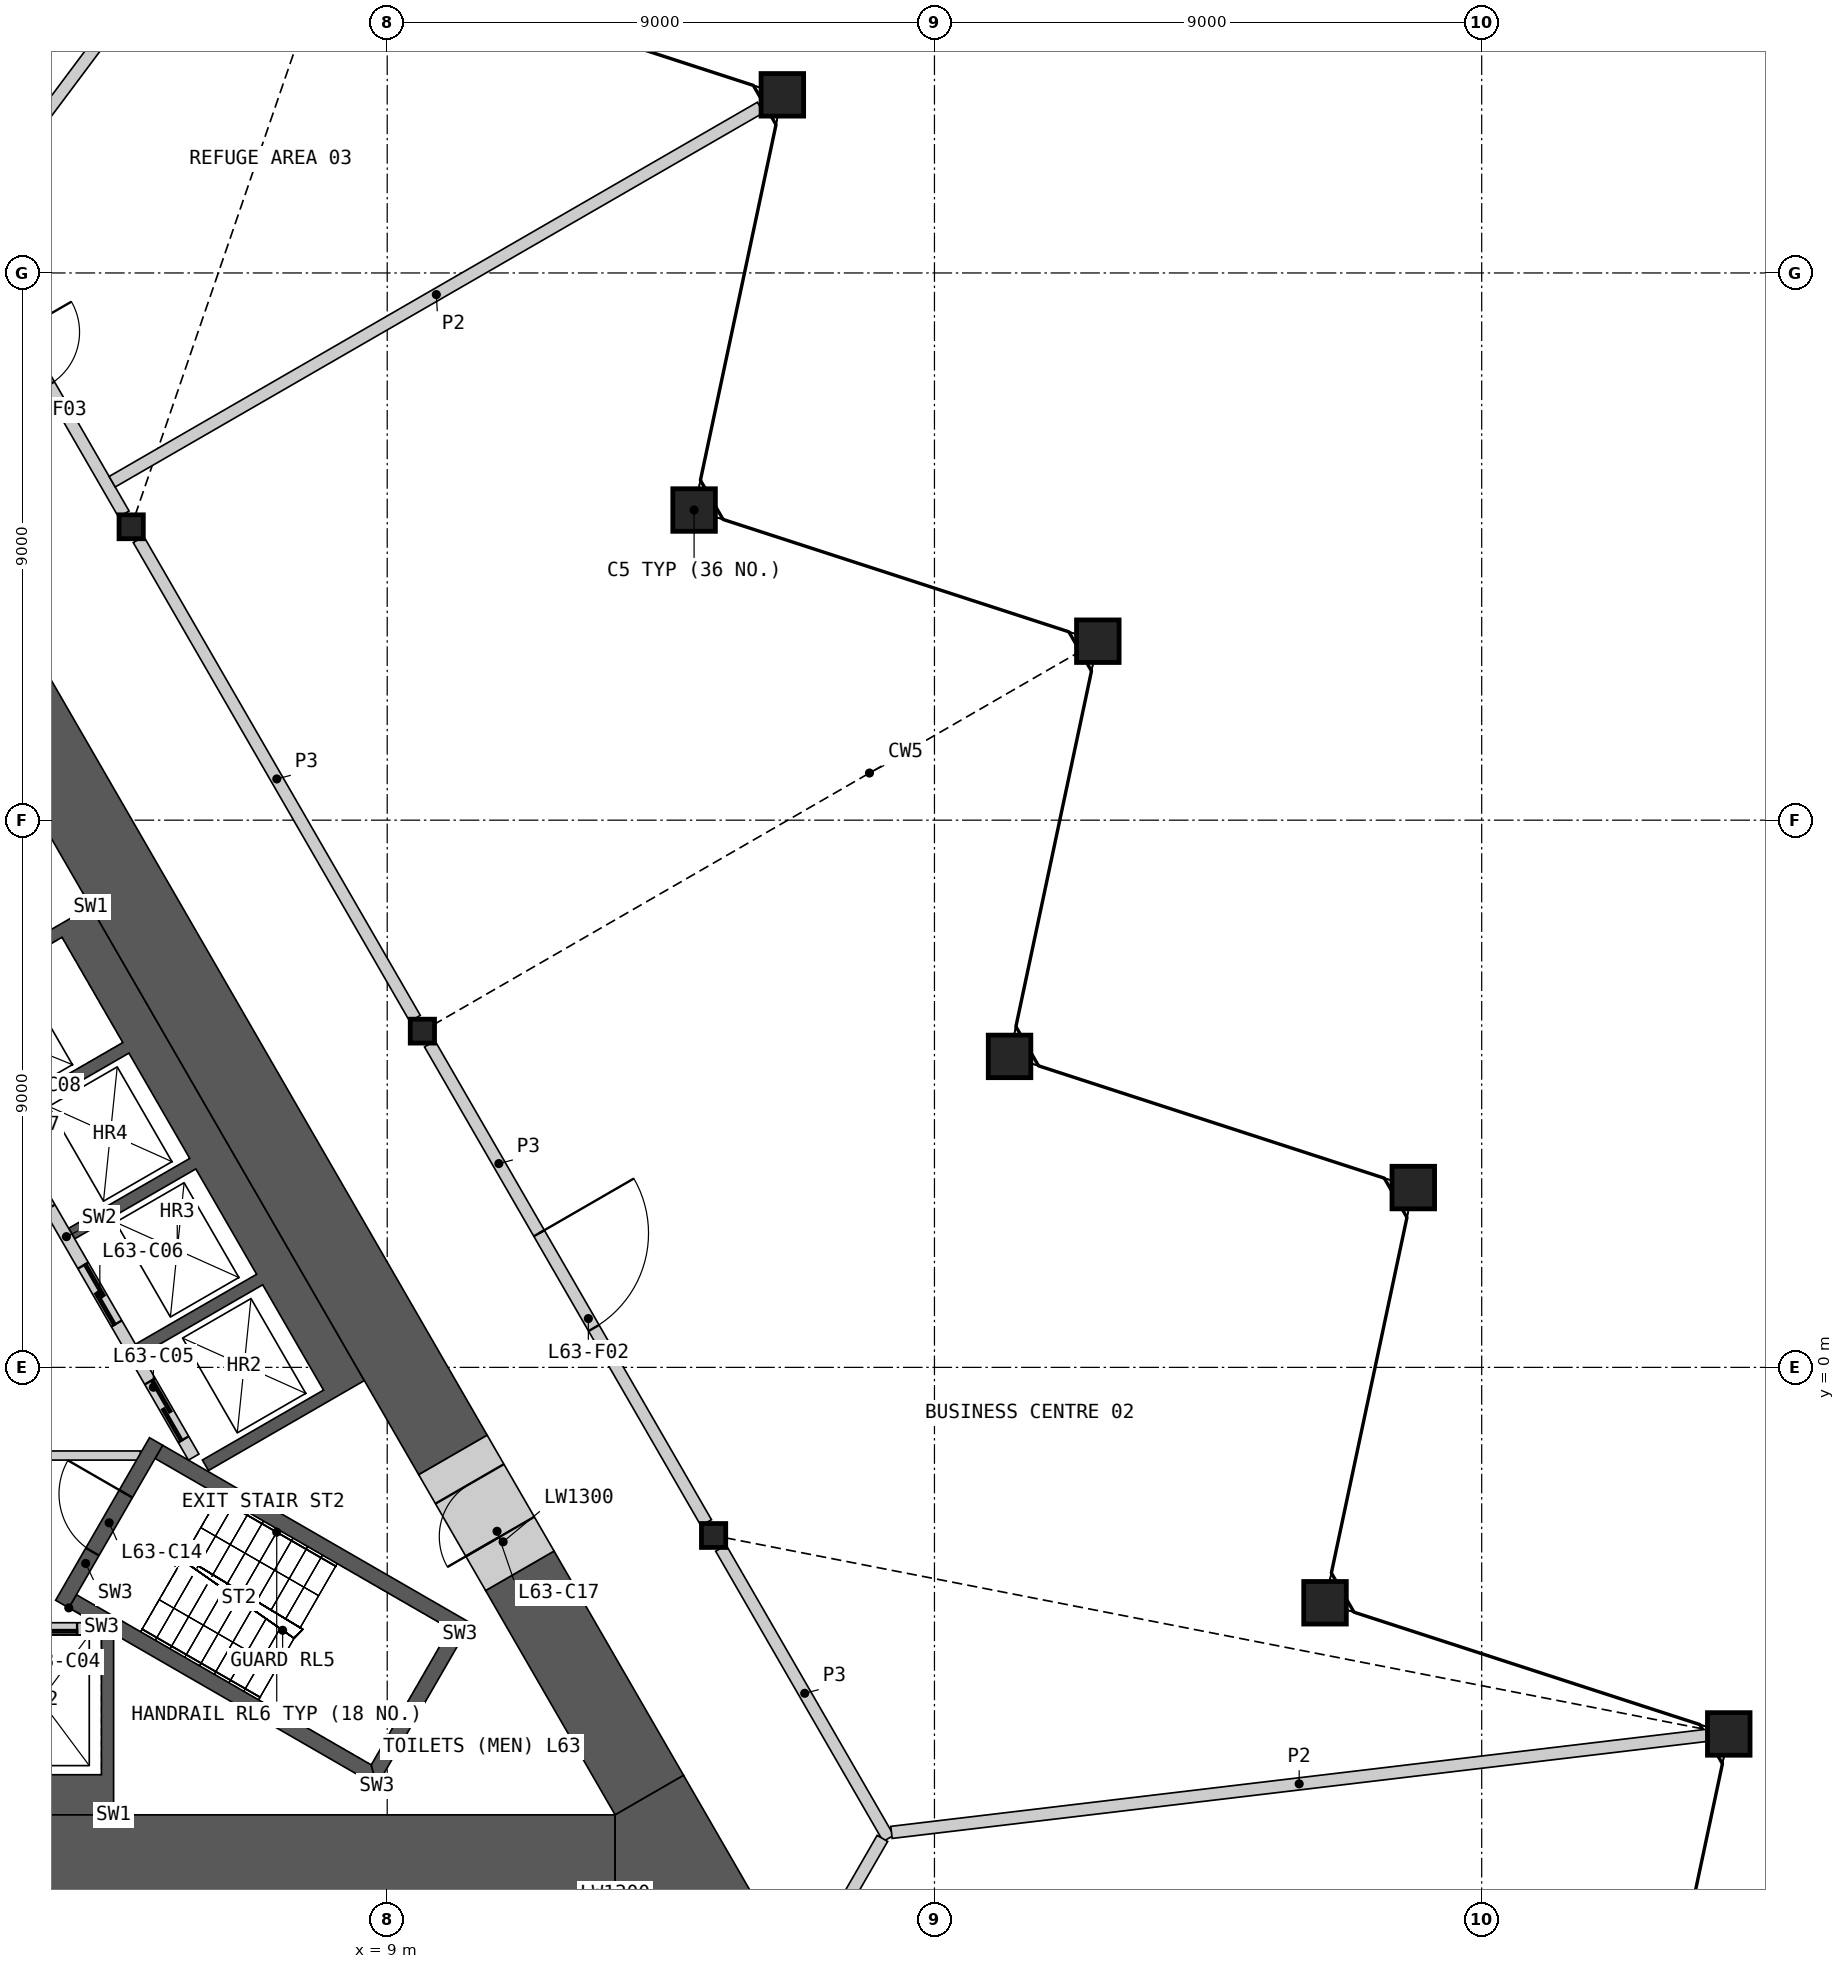
"""IFC4 building model, lengths in metres.
Left out: names, types, materials, properties, quantities, classifications, styles, units other than length and angle.
Written with IfcOpenShell. Run it as: python <this file> out.ifc"""

import sys

from ifc_helpers import new_model, si_unit, direction, frame, frame_2d, origin, origin_2d, place, context, subcontext, project, spatial, polyline, rectangle, hollow_rectangle, i_section, outline, extrude, element, fill, save


model = new_model("IFC4")
c1 = context("Model", 3, precision=1e-05, world=origin(), true_north=direction((0.0, 1.0)))
c2 = subcontext(c1, "Body", "Model", "MODEL_VIEW")
j1 = project(units=[si_unit("LENGTHUNIT", "METRE"), si_unit("PLANEANGLEUNIT", "RADIAN")], contexts=[c1])
p1 = place(None, origin())
s1 = spatial("IfcSite", under=j1, at=p1, CompositionType="ELEMENT")
p2 = place(p1, origin())
s2 = spatial("IfcBuilding", under=s1, at=p2, CompositionType="ELEMENT")
p3 = place(p2, frame((0.0, 0.0, 277.8)))
s3 = spatial("IfcBuildingStorey", under=s2, at=p3, CompositionType="ELEMENT", Elevation=277.8)
for number, where, z_axis, x_axis in (
    (1, (31.063, -6.029, 0.0), (0.0, 0.0, 1.0), (1.0, 0.0, 0.0)),
    (2, (24.423, -3.872, 0.0), (0.0, 0.0, 1.0), (1.0, 0.0, 0.0)),
    (3, (25.875, 2.957, 0.0), (0.0, 0.0, 1.0), (1.0, 0.0, 0.0)),
    (4, (19.235, 5.115, 0.0), (0.0, 0.0, 1.0), (1.0, 0.0, 0.0)),
    (5, (20.687, 11.943, 0.0), (0.0, 0.0, 1.0), (1.0, 0.0, 0.0)),
    (6, (14.047, 14.101, 0.0), (0.0, 0.0, 1.0), (1.0, 0.0, 0.0)),
    (7, (15.499, 20.93, 0.0), (0.0, 0.0, 1.0), (1.0, 0.0, 0.0)),
):
    element("IfcColumn", number, at=place(p3, frame(where, z_axis=z_axis, x_axis=x_axis)), inside=s3, PredefinedType="COLUMN", context=c2, shape_type="SweptSolid", body=[
        extrude(hollow_rectangle(XDim=0.7, YDim=0.7, WallThickness=0.045, at=origin_2d()), origin(), (0.0, 0.0, 1.0), 10.0),
    ])
for number, where, z_axis, x_axis in (
    (8, (14.368, -2.765, 0.0), (0.0, 0.0, 1.0), (1.0, 0.0, 0.0)),
    (9, (9.578, 5.53, 0.0), (0.0, 0.0, 1.0), (1.0, 0.0, 0.0)),
    (10, (4.789, 13.825, 0.0), (0.0, 0.0, 1.0), (1.0, 0.0, 0.0)),
):
    element("IfcColumn", number, at=place(p3, frame(where, z_axis=z_axis, x_axis=x_axis)), inside=s3, PredefinedType="COLUMN", context=c2, shape_type="SweptSolid", body=[
        extrude(i_section(OverallWidth=0.399, OverallDepth=0.393, WebThickness=0.023, FlangeThickness=0.037, at=origin_2d()), origin(), (0.0, 0.0, 1.0), 10.0),
    ])
p4 = place(p3, origin())
e11 = element("IfcWall", 11, at=p4, inside=s3, PredefinedType="SHEAR", context=c2, shape_type="SweptSolid", body=[
    extrude(outline(polyline([(4.5, -7.36), (-4.5, -7.36), (-4.5, -4.4), (-4.3, -4.4), (-4.3, -6.7), (-2.3, -6.7), (-2.3, -4.4), (-2.1, -4.4), (-2.1, -6.7), (-0.1, -6.7), (-0.1, -4.4), (0.1, -4.4), (0.1, -6.7), (2.1, -6.7), (2.1, -4.4), (2.3, -4.4), (2.3, -6.7), (4.3, -6.7), (4.3, -4.4), (4.5, -4.4), (4.5, -7.36)])), origin(), (0.0, 0.0, 1.0), 9.65),
])
p5 = place(p3, frame((-4.187, -4.3, 0.0), z_axis=(0.0, 0.0, 1.0), x_axis=(1.0, 0.0, 0.0)))
e12 = element("IfcWall", 12, at=p5, inside=s3, PredefinedType="SOLIDWALL", context=c2, shape_type="SweptSolid", body=[
    extrude(rectangle(XDim=8.373, YDim=0.2, at=frame_2d((4.187, 0.0))), origin(), (0.0, 0.0, 1.0), 9.65),
])
p6 = place(p5, frame((0.287, 0.0, 0.0)))
e13 = element("IfcOpeningElement", 13, at=p6, cuts=e12, PredefinedType="OPENING", context=c2, shape_type="SweptSolid", body=[
    extrude(rectangle(XDim=1.2, YDim=2.1, at=frame_2d((0.6, 1.05))), frame((0.0, 0.11, 0.0), z_axis=(0.0, -1.0, 0.0), x_axis=(1.0, 0.0, 0.0)), (0.0, 0.0, 1.0), 0.22),
])
p7 = place(p5, frame((2.387, 0.0, 0.0)))
e14 = element("IfcOpeningElement", 14, at=p7, cuts=e12, PredefinedType="OPENING", context=c2, shape_type="SweptSolid", body=[
    extrude(rectangle(XDim=1.4, YDim=2.1, at=frame_2d((0.7, 1.05))), frame((0.0, 0.11, 0.0), z_axis=(0.0, -1.0, 0.0), x_axis=(1.0, 0.0, 0.0)), (0.0, 0.0, 1.0), 0.22),
])
p8 = place(p5, frame((4.737, 0.0, 0.0)))
e15 = element("IfcOpeningElement", 15, at=p8, cuts=e12, PredefinedType="OPENING", context=c2, shape_type="SweptSolid", body=[
    extrude(rectangle(XDim=1.1, YDim=2.1, at=frame_2d((0.55, 1.05))), frame((0.0, 0.11, 0.0), z_axis=(0.0, -1.0, 0.0), x_axis=(1.0, 0.0, 0.0)), (0.0, 0.0, 1.0), 0.22),
])
p9 = place(p5, frame((6.887, 0.0, 0.0)))
e16 = element("IfcOpeningElement", 16, at=p9, cuts=e12, PredefinedType="OPENING", context=c2, shape_type="SweptSolid", body=[
    extrude(rectangle(XDim=1.2, YDim=2.1, at=frame_2d((0.6, 1.05))), frame((0.0, 0.11, 0.0), z_axis=(0.0, -1.0, 0.0), x_axis=(1.0, 0.0, 0.0)), (0.0, 0.0, 1.0), 0.22),
])
p10 = place(p3, origin())
e17 = element("IfcWall", 17, at=p10, inside=s3, PredefinedType="SHEAR", context=c2, shape_type="SweptSolid", body=[
    extrude(outline(polyline([(4.124, 7.577), (8.624, -0.217), (8.231, -0.444), (6.061, -1.697), (5.96, -1.524), (7.952, -0.374), (6.952, 1.358), (4.96, 0.208), (4.861, 0.381), (6.852, 1.531), (5.852, 3.263), (3.861, 2.113), (3.76, 2.287), (5.752, 3.437), (4.752, 5.169), (2.76, 4.019), (2.66, 4.192), (4.652, 5.342), (3.652, 7.074), (1.66, 5.924), (1.561, 6.097), (3.731, 7.35), (4.124, 7.577)])), origin(), (0.0, 0.0, 1.0), 9.65),
])
p11 = place(p3, frame((5.817, -1.476, 0.0), z_axis=(0.0, 0.0, 1.0), x_axis=(-0.500002616675, 0.866023893041, 0.0)))
e18 = element("IfcWall", 18, at=p11, inside=s3, PredefinedType="SOLIDWALL", context=c2, shape_type="SweptSolid", body=[
    extrude(rectangle(XDim=8.373, YDim=0.2, at=frame_2d((4.187, 0.0))), origin(), (0.0, 0.0, 1.0), 9.65),
])
p12 = place(p11, frame((0.337, 0.0, 0.0)))
e19 = element("IfcOpeningElement", 19, at=p12, cuts=e18, PredefinedType="OPENING", context=c2, shape_type="SweptSolid", body=[
    extrude(rectangle(XDim=1.1, YDim=2.1, at=frame_2d((0.55, 1.05))), frame((0.0, 0.11, 0.0), z_axis=(0.0, -1.0, 0.0), x_axis=(1.0, 0.0, 0.0)), (0.0, 0.0, 1.0), 0.22),
])
p13 = place(p11, frame((2.537, 0.0, 0.0)))
e20 = element("IfcOpeningElement", 20, at=p13, cuts=e18, PredefinedType="OPENING", context=c2, shape_type="SweptSolid", body=[
    extrude(rectangle(XDim=1.1, YDim=2.1, at=frame_2d((0.55, 1.05))), frame((0.0, 0.11, 0.0), z_axis=(0.0, -1.0, 0.0), x_axis=(1.0, 0.0, 0.0)), (0.0, 0.0, 1.0), 0.22),
])
p14 = place(p11, frame((4.737, 0.0, 0.0)))
e21 = element("IfcOpeningElement", 21, at=p14, cuts=e18, PredefinedType="OPENING", context=c2, shape_type="SweptSolid", body=[
    extrude(rectangle(XDim=1.1, YDim=2.1, at=frame_2d((0.55, 1.05))), frame((0.0, 0.11, 0.0), z_axis=(0.0, -1.0, 0.0), x_axis=(1.0, 0.0, 0.0)), (0.0, 0.0, 1.0), 0.22),
])
p15 = place(p11, frame((6.937, 0.0, 0.0)))
e22 = element("IfcOpeningElement", 22, at=p15, cuts=e18, PredefinedType="OPENING", context=c2, shape_type="SweptSolid", body=[
    extrude(rectangle(XDim=1.1, YDim=2.1, at=frame_2d((0.55, 1.05))), frame((0.0, 0.11, 0.0), z_axis=(0.0, -1.0, 0.0), x_axis=(1.0, 0.0, 0.0)), (0.0, 0.0, 1.0), 0.22),
])
p16 = place(p3, frame((-4.941, -1.45, 0.0), z_axis=(0.0, 0.0, 1.0), x_axis=(1.0, 0.0, 0.0)))
e23 = element("IfcWall", 23, at=p16, inside=s3, PredefinedType="PARTITIONING", context=c2, shape_type="SweptSolid", body=[
    extrude(rectangle(XDim=9.882, YDim=0.15, at=frame_2d((4.941, 0.0))), origin(), (0.0, 0.0, 1.0), 9.65),
])
p17 = place(p16, frame((4.391, 0.0, 0.0)))
e24 = element("IfcOpeningElement", 24, at=p17, cuts=e23, PredefinedType="OPENING", context=c2, shape_type="SweptSolid", body=[
    extrude(rectangle(XDim=1.1, YDim=2.1, at=frame_2d((0.55, 1.05))), frame((0.0, 0.085, 0.0), z_axis=(0.0, -1.0, 0.0), x_axis=(1.0, 0.0, 0.0)), (0.0, 0.0, 1.0), 0.17),
])
p18 = place(p3, origin())
e25 = element("IfcWall", 25, at=p18, inside=s3, PredefinedType="SHEAR", context=c2, shape_type="SweptSolid", body=[
    extrude(outline(polyline([(3.763, -3.956), (8.83, -6.881), (8.738, -6.539), (3.888, -3.739), (3.763, -3.956)])), origin(), (0.0, 0.0, 1.0), 9.65),
])
p19 = place(p3, origin())
e26 = element("IfcWall", 26, at=p19, inside=s3, PredefinedType="SHEAR", context=c2, shape_type="SweptSolid", body=[
    extrude(outline(polyline([(8.83, -6.881), (10.374, -4.206), (10.032, -4.298), (8.738, -6.539), (8.83, -6.881)])), origin(), (0.0, 0.0, 1.0), 9.65),
])
p20 = place(p3, origin())
e27 = element("IfcWall", 27, at=p20, inside=s3, PredefinedType="SHEAR", context=c2, shape_type="SweptSolid", body=[
    extrude(outline(polyline([(10.032, -4.298), (10.374, -4.206), (5.307, -1.281), (5.182, -1.498), (10.032, -4.298)])), origin(), (0.0, 0.0, 1.0), 9.65),
])
p21 = place(p3, frame((3.655, -3.893, 0.0), z_axis=(0.0, 0.0, 1.0), x_axis=(0.499982516597, 0.866035497597, 0.0)))
e28 = element("IfcWall", 28, at=p21, inside=s3, PredefinedType="SHEAR", context=c2, shape_type="SweptSolid", body=[
    extrude(rectangle(XDim=3.088, YDim=0.25, at=frame_2d((1.544, 0.0))), origin(), (0.0, 0.0, 1.0), 9.65),
])
p22 = place(p21, frame((0.994, 0.0, 0.0)))
e29 = element("IfcOpeningElement", 29, at=p22, cuts=e28, PredefinedType="OPENING", context=c2, shape_type="SweptSolid", body=[
    extrude(rectangle(XDim=1.1, YDim=2.1, at=frame_2d((0.55, 1.05))), frame((0.0, 0.135, 0.0), z_axis=(0.0, -1.0, 0.0), x_axis=(1.0, 0.0, 0.0)), (0.0, 0.0, 1.0), 0.27),
])
p23 = place(p3, frame((-12.748, -8.01, 0.0), z_axis=(0.0, 0.0, 1.0), x_axis=(1.0, 0.0, 0.0)))
e30 = element("IfcWall", 30, at=p23, inside=s3, PredefinedType="SHEAR", context=c2, shape_type="SweptSolid", body=[
    extrude(rectangle(XDim=25.497, YDim=1.3, at=frame_2d((12.748, 0.0))), origin(), (0.0, 0.0, 1.0), 9.65),
])
p24 = place(p3, frame((10.081, -1.441, 0.0), z_axis=(0.0, 0.0, 1.0), x_axis=(-0.500002581376, 0.866023913421, 0.0)))
e31 = element("IfcWall", 31, at=p24, inside=s3, PredefinedType="SHEAR", context=c2, shape_type="SweptSolid", body=[
    extrude(rectangle(XDim=19.037, YDim=1.3, at=frame_2d((9.518, 0.0))), origin(), (0.0, 0.0, 1.0), 9.65),
])
p25 = place(p3, frame((13.311, -7.035, 0.0), z_axis=(0.0, 0.0, 1.0), x_axis=(-0.500003555838, 0.866023350811, 0.0)))
e32 = element("IfcWall", 32, at=p25, inside=s3, PredefinedType="SHEAR", context=c2, shape_type="SweptSolid", body=[
    extrude(rectangle(XDim=4.26, YDim=1.3, at=frame_2d((2.13, 0.0))), origin(), (0.0, 0.0, 1.0), 9.65),
])
p26 = place(p3, origin())
e33 = element("IfcWall", 33, at=p26, inside=s3, PredefinedType="SHEAR", context=c2, shape_type="SweptSolid", body=[
    extrude(outline(polyline([(12.748, -8.66), (12.748, -7.36), (13.874, -6.71), (15.0, -8.66), (12.748, -8.66)])), origin(), (0.0, 0.0, 1.0), 9.65),
])
p27 = place(p3, frame((11.181, -3.346, 0.0), z_axis=(0.0, 0.0, 1.0), x_axis=(-0.499946605688, 0.86605622881, 0.0)))
e34 = element("IfcWall", 34, at=p27, inside=s3, PredefinedType="SHEAR", context=c2, shape_type="SweptSolid", body=[
    extrude(rectangle(XDim=2.2, YDim=1.3, at=frame_2d((1.1, 0.0))), origin(), (0.0, 0.0, 1.0), 9.65),
])
p28 = place(p27, frame((0.65, 0.0, 0.0)))
e35 = element("IfcOpeningElement", 35, at=p28, cuts=e34, PredefinedType="OPENING", context=c2, shape_type="SweptSolid", body=[
    extrude(rectangle(XDim=1.0, YDim=2.1, at=frame_2d((0.5, 1.05))), frame((0.0, 0.66, 0.0), z_axis=(0.0, -1.0, 0.0), x_axis=(1.0, 0.0, 0.0)), (0.0, 0.0, 1.0), 1.32),
])
p29 = place(p3, frame((9.699, 5.321, 0.0), z_axis=(0.0, 0.0, 1.0), x_axis=(0.49998193945, -0.866035830797, 0.0)))
e36 = element("IfcWall", 36, at=p29, inside=s3, PredefinedType="PARTITIONING", context=c2, shape_type="SweptSolid", body=[
    extrude(rectangle(XDim=9.094, YDim=0.2, at=frame_2d((4.547, 0.0))), origin(), (0.0, 0.0, 1.0), 9.65),
])
p30 = place(p29, frame((3.597, 0.0, 0.0)))
e37 = element("IfcOpeningElement", 37, at=p30, cuts=e36, PredefinedType="OPENING", context=c2, shape_type="SweptSolid", body=[
    extrude(rectangle(XDim=1.8, YDim=2.1, at=frame_2d((0.9, 1.05))), frame((0.0, 0.11, 0.0), z_axis=(0.0, -1.0, 0.0), x_axis=(1.0, 0.0, 0.0)), (0.0, 0.0, 1.0), 0.22),
])
p31 = place(p3, frame((4.91, 13.616, 0.0), z_axis=(0.0, 0.0, 1.0), x_axis=(0.50000207303, -0.866024206917, 0.0)))
e38 = element("IfcWall", 38, at=p31, inside=s3, PredefinedType="PARTITIONING", context=c2, shape_type="SweptSolid", body=[
    extrude(rectangle(XDim=9.095, YDim=0.2, at=frame_2d((4.547, 0.0))), origin(), (0.0, 0.0, 1.0), 9.65),
])
p32 = place(p3, frame((1.913, 18.807, 0.0), z_axis=(0.0, 0.0, 1.0), x_axis=(0.499984524817, -0.866034338201, 0.0)))
e39 = element("IfcWall", 39, at=p32, inside=s3, PredefinedType="PARTITIONING", context=c2, shape_type="SweptSolid", body=[
    extrude(rectangle(XDim=5.51, YDim=0.2, at=frame_2d((2.755, 0.0))), origin(), (0.0, 0.0, 1.0), 9.65),
])
p33 = place(p32, frame((2.055, 0.0, 0.0)))
e40 = element("IfcOpeningElement", 40, at=p33, cuts=e39, PredefinedType="OPENING", context=c2, shape_type="SweptSolid", body=[
    extrude(rectangle(XDim=1.0, YDim=2.1, at=frame_2d((0.5, 1.05))), frame((0.0, 0.11, 0.0), z_axis=(0.0, -1.0, 0.0), x_axis=(1.0, 0.0, 0.0)), (0.0, 0.0, 1.0), 0.22),
])
p34 = place(p3, frame((14.489, -2.975, 0.0), z_axis=(0.0, 0.0, 1.0), x_axis=(0.500017753321, -0.866015153657, 0.0)))
e41 = element("IfcWall", 41, at=p34, inside=s3, PredefinedType="PARTITIONING", context=c2, shape_type="SweptSolid", body=[
    extrude(rectangle(XDim=5.51, YDim=0.2, at=frame_2d((2.755, 0.0))), origin(), (0.0, 0.0, 1.0), 9.65),
])
p35 = place(p3, frame((15.281, -10.974, 0.0), z_axis=(0.0, 0.0, 1.0), x_axis=(0.499958791762, 0.866049194065, 0.0)))
e42 = element("IfcWall", 42, at=p35, inside=s3, PredefinedType="PARTITIONING", context=c2, shape_type="SweptSolid", body=[
    extrude(rectangle(XDim=3.726, YDim=0.2, at=frame_2d((1.863, 0.0))), origin(), (0.0, 0.0, 1.0), 9.65),
])
p36 = place(p3, frame((17.293, -7.648, 0.0), z_axis=(0.0, 0.0, 1.0), x_axis=(0.992988122615, 0.118214163049, 0.0)))
e43 = element("IfcWall", 43, at=p36, inside=s3, PredefinedType="PARTITIONING", context=c2, shape_type="SweptSolid", body=[
    extrude(rectangle(XDim=13.505, YDim=0.2, at=frame_2d((6.752, 0.0))), origin(), (0.0, 0.0, 1.0), 8.804),
])
p37 = place(p3, frame((2.023, 18.801, 0.0), z_axis=(0.0, 0.0, 1.0), x_axis=(0.598865038135, 0.800849964787, 0.0)))
e44 = element("IfcWall", 44, at=p37, inside=s3, PredefinedType="PARTITIONING", context=c2, shape_type="SweptSolid", body=[
    extrude(rectangle(XDim=13.43, YDim=0.2, at=frame_2d((6.715, 0.0))), origin(), (0.0, 0.0, 1.0), 8.804),
])
p38 = place(p3, frame((4.477, 14.566, 0.0), z_axis=(0.0, 0.0, 1.0), x_axis=(0.866024427045, 0.500001691758, 0.0)))
e45 = element("IfcWall", 45, at=p38, inside=s3, PredefinedType="PARTITIONING", context=c2, shape_type="SweptSolid", body=[
    extrude(rectangle(XDim=12.311, YDim=0.2, at=frame_2d((6.156, 0.0))), origin(), (0.0, 0.0, 1.0), 8.804),
])
p39 = place(p9, origin())
e46 = element("IfcDoor", 46, at=p39, inside=s3, OperationType="SLIDING_TO_LEFT", PredefinedType="DOOR", context=c2, shape_type="SweptSolid", body=[
    extrude(rectangle(XDim=1.2, YDim=2.1, at=frame_2d((0.6, 1.05))), frame((0.0, 0.025, 0.0), z_axis=(0.0, -1.0, 0.0), x_axis=(1.0, 0.0, 0.0)), (0.0, 0.0, 1.0), 0.05),
])
fill(e16, e46)
p40 = place(p12, origin())
e47 = element("IfcDoor", 47, at=p40, inside=s3, OperationType="SLIDING_TO_LEFT", PredefinedType="DOOR", context=c2, shape_type="SweptSolid", body=[
    extrude(rectangle(XDim=1.1, YDim=2.1, at=frame_2d((0.55, 1.05))), frame((0.0, 0.025, 0.0), z_axis=(0.0, -1.0, 0.0), x_axis=(1.0, 0.0, 0.0)), (0.0, 0.0, 1.0), 0.05),
])
fill(e19, e47)
p41 = place(p13, origin())
e48 = element("IfcDoor", 48, at=p41, inside=s3, OperationType="SLIDING_TO_LEFT", PredefinedType="DOOR", context=c2, shape_type="SweptSolid", body=[
    extrude(rectangle(XDim=1.1, YDim=2.1, at=frame_2d((0.55, 1.05))), frame((0.0, 0.025, 0.0), z_axis=(0.0, -1.0, 0.0), x_axis=(1.0, 0.0, 0.0)), (0.0, 0.0, 1.0), 0.05),
])
fill(e20, e48)
p42 = place(p22, origin())
e49 = element("IfcDoor", 49, at=p42, inside=s3, OperationType="SINGLE_SWING_RIGHT", PredefinedType="DOOR", context=c2, shape_type="SweptSolid", body=[
    extrude(rectangle(XDim=1.1, YDim=2.1, at=frame_2d((0.55, 1.05))), frame((0.0, 0.025, 0.0), z_axis=(0.0, -1.0, 0.0), x_axis=(1.0, 0.0, 0.0)), (0.0, 0.0, 1.0), 0.05),
])
fill(e29, e49)
p43 = place(p28, origin())
e50 = element("IfcDoor", 50, at=p43, inside=s3, OperationType="SINGLE_SWING_LEFT", PredefinedType="DOOR", context=c2, shape_type="SweptSolid", body=[
    extrude(rectangle(XDim=1.0, YDim=2.1, at=frame_2d((0.5, 1.05))), frame((0.0, 0.405, 0.0), z_axis=(0.0, -1.0, 0.0), x_axis=(1.0, 0.0, 0.0)), (0.0, 0.0, 1.0), 0.05),
])
fill(e35, e50)
p44 = place(p30, origin())
e51 = element("IfcDoor", 51, at=p44, inside=s3, OperationType="DOUBLE_DOOR_SINGLE_SWING", PredefinedType="DOOR", context=c2, shape_type="SweptSolid", body=[
    extrude(rectangle(XDim=1.8, YDim=2.1, at=frame_2d((0.9, 1.05))), frame((0.0, 0.025, 0.0), z_axis=(0.0, -1.0, 0.0), x_axis=(1.0, 0.0, 0.0)), (0.0, 0.0, 1.0), 0.05),
])
fill(e37, e51)
save(model, sys.argv[1])
